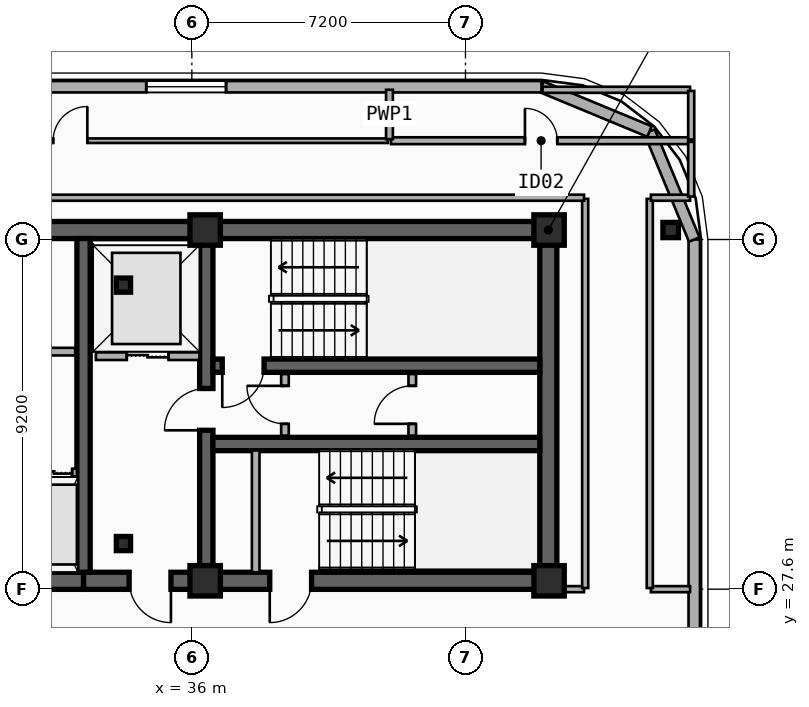
"""IFC4 building model, lengths in metres.
Left out: names, types, materials, properties, quantities, classifications, styles, units other than length and angle.
Written with IfcOpenShell. Run it as: python <this file> out.ifc"""

import sys

from ifc_helpers import new_model, si_unit, direction, frame, frame_2d, origin, origin_2d, place, context, subcontext, project, spatial, rectangle, i_section, extrude, element, fill, save


model = new_model("IFC4")
c1 = context("Model", 3, precision=1e-05, world=origin(), true_north=direction((0.0, 1.0)))
c2 = subcontext(c1, "Body", "Model", "MODEL_VIEW")
j1 = project(units=[si_unit("LENGTHUNIT", "METRE"), si_unit("PLANEANGLEUNIT", "RADIAN")], contexts=[c1])
p1 = place(None, origin())
s1 = spatial("IfcSite", under=j1, at=p1, CompositionType="ELEMENT")
p2 = place(p1, origin())
s2 = spatial("IfcBuilding", under=s1, at=p2, CompositionType="ELEMENT")
p3 = place(p2, frame((0.0, 0.0, 262.1)))
s3 = spatial("IfcBuildingStorey", under=s2, at=p3, CompositionType="ELEMENT", Elevation=262.1)
p4 = place(p3, frame((12.15, 37.05, 0.0), z_axis=(0.0, 0.0, 1.0), x_axis=(1.0, 0.0, 0.0)))
e1 = element("IfcWall", 1, at=p4, inside=s3, PredefinedType="SHEAR", context=c2, shape_type="SweptSolid", body=[
    extrude(rectangle(XDim=33.23, YDim=0.45, at=frame_2d((16.615, 0.0))), origin(), (0.0, 0.0, 1.0), 3.7),
])
p5 = place(p3, frame((33.15, 27.82, 0.0), z_axis=(0.0, 0.0, 1.0), x_axis=(-1.0, 0.0, 0.0)))
e2 = element("IfcWall", 2, at=p5, inside=s3, PredefinedType="SHEAR", context=c2, shape_type="SweptSolid", body=[
    extrude(rectangle(XDim=11.97, YDim=0.45, at=frame_2d((5.985, 0.0))), origin(), (0.0, 0.0, 1.0), 3.7),
])
p6 = place(p5, frame((6.1, 0.0, 0.0)))
e3 = element("IfcOpeningElement", 3, at=p6, cuts=e2, PredefinedType="OPENING", context=c2, shape_type="SweptSolid", body=[
    extrude(rectangle(XDim=1.6, YDim=2.2, at=frame_2d((0.8, 1.1))), frame((0.0, 0.235, 0.0), z_axis=(0.0, -1.0, 0.0), x_axis=(1.0, 0.0, 0.0)), (0.0, 0.0, 1.0), 0.47),
])
p7 = place(p3, frame((45.38, 27.82, 0.0), z_axis=(0.0, 0.0, 1.0), x_axis=(-1.0, 0.0, 0.0)))
e4 = element("IfcWall", 4, at=p7, inside=s3, PredefinedType="SHEAR", context=c2, shape_type="SweptSolid", body=[
    extrude(rectangle(XDim=12.23, YDim=0.45, at=frame_2d((6.115, 0.0))), origin(), (0.0, 0.0, 1.0), 3.7),
])
p8 = place(p7, frame((9.93, 0.0, 0.0)))
e5 = element("IfcOpeningElement", 5, at=p8, cuts=e4, PredefinedType="OPENING", context=c2, shape_type="SweptSolid", body=[
    extrude(rectangle(XDim=1.1, YDim=2.15, at=frame_2d((0.55, 1.075))), frame((0.0, 0.235, 0.0), z_axis=(0.0, -1.0, 0.0), x_axis=(1.0, 0.0, 0.0)), (0.0, 0.0, 1.0), 0.47),
])
p9 = place(p7, frame((6.23, 0.0, 0.0)))
e6 = element("IfcOpeningElement", 6, at=p9, cuts=e4, PredefinedType="OPENING", context=c2, shape_type="SweptSolid", body=[
    extrude(rectangle(XDim=1.1, YDim=2.15, at=frame_2d((0.55, 1.075))), frame((0.0, 0.235, 0.0), z_axis=(0.0, -1.0, 0.0), x_axis=(1.0, 0.0, 0.0)), (0.0, 0.0, 1.0), 0.47),
])
p10 = place(p3, frame((45.38, 28.045, 0.0), z_axis=(0.0, 0.0, 1.0), x_axis=(0.0, 1.0, 0.0)))
e7 = element("IfcWall", 7, at=p10, inside=s3, PredefinedType="SHEAR", context=c2, shape_type="SweptSolid", body=[
    extrude(rectangle(XDim=8.78, YDim=0.45, at=frame_2d((4.39, 0.0))), origin(), (0.0, 0.0, 1.0), 3.7),
])
p11 = place(p3, frame((33.15, 28.045, 0.0), z_axis=(0.0, 0.0, 1.0), x_axis=(0.0, 1.0, 0.0)))
e8 = element("IfcWall", 8, at=p11, inside=s3, PredefinedType="SHEAR", context=c2, shape_type="SweptSolid", body=[
    extrude(rectangle(XDim=8.78, YDim=0.35, at=frame_2d((4.39, 0.0))), origin(), (0.0, 0.0, 1.0), 3.7),
])
p12 = place(p3, frame((36.38, 28.045, 0.0), z_axis=(0.0, 0.0, 1.0), x_axis=(0.0, 1.0, 0.0)))
e9 = element("IfcWall", 9, at=p12, inside=s3, PredefinedType="SHEAR", context=c2, shape_type="SweptSolid", body=[
    extrude(rectangle(XDim=8.78, YDim=0.35, at=frame_2d((4.39, 0.0))), origin(), (0.0, 0.0, 1.0), 3.7),
])
p13 = place(p12, frame((3.735, 0.0, 0.0)))
e10 = element("IfcOpeningElement", 10, at=p13, cuts=e9, PredefinedType="OPENING", context=c2, shape_type="SweptSolid", body=[
    extrude(rectangle(XDim=1.1, YDim=2.15, at=frame_2d((0.55, 1.075))), frame((0.0, 0.185, 0.0), z_axis=(0.0, -1.0, 0.0), x_axis=(1.0, 0.0, 0.0)), (0.0, 0.0, 1.0), 0.37),
])
p14 = place(p3, frame((45.155, 33.48, 0.0), z_axis=(0.0, 0.0, 1.0), x_axis=(-1.0, 0.0, 0.0)))
e11 = element("IfcWall", 11, at=p14, inside=s3, PredefinedType="SHEAR", context=c2, shape_type="SweptSolid", body=[
    extrude(rectangle(XDim=8.6, YDim=0.35, at=frame_2d((4.3, 0.0))), origin(), (0.0, 0.0, 1.0), 3.7),
])
p15 = place(p14, frame((7.255, 0.0, 0.0)))
e12 = element("IfcOpeningElement", 12, at=p15, cuts=e11, PredefinedType="OPENING", context=c2, shape_type="SweptSolid", body=[
    extrude(rectangle(XDim=1.1, YDim=2.15, at=frame_2d((0.55, 1.075))), frame((0.0, 0.185, 0.0), z_axis=(0.0, -1.0, 0.0), x_axis=(1.0, 0.0, 0.0)), (0.0, 0.0, 1.0), 0.37),
])
p16 = place(p3, frame((36.555, 31.42, 0.0), z_axis=(0.0, 0.0, 1.0), x_axis=(1.0, 0.0, 0.0)))
e13 = element("IfcWall", 13, at=p16, inside=s3, PredefinedType="SHEAR", context=c2, shape_type="SweptSolid", body=[
    extrude(rectangle(XDim=8.6, YDim=0.35, at=frame_2d((4.3, 0.0))), origin(), (0.0, 0.0, 1.0), 3.7),
])
for number, where, z_axis, x_axis in (
    (14, (34.2, 28.8, 0.0), (0.0, 0.0, 1.0), (1.0, 0.0, 0.0)),
    (15, (34.2, 35.6, 0.0), (0.0, 0.0, 1.0), (1.0, 0.0, 0.0)),
):
    element("IfcColumn", number, at=place(p3, frame(where, z_axis=z_axis, x_axis=x_axis)), inside=s3, PredefinedType="COLUMN", context=c2, shape_type="SweptSolid", body=[
        extrude(i_section(OverallWidth=0.374, OverallDepth=0.372, WebThickness=0.017, FlangeThickness=0.027, FilletRadius=0.015, at=origin_2d()), origin(), (0.0, 0.0, 1.0), 3.7),
    ])
for number, where, z_axis, x_axis in (
    (16, (36.35, 27.82, 0.0), (0.0, 0.0, 1.0), (1.0, 0.0, 0.0)),
    (17, (36.35, 37.05, 0.0), (0.0, 0.0, 1.0), (1.0, 0.0, 0.0)),
    (18, (45.4, 27.82, 0.0), (0.0, 0.0, 1.0), (1.0, 0.0, 0.0)),
    (19, (45.4, 37.05, 0.0), (0.0, 0.0, 1.0), (1.0, 0.0, 0.0)),
):
    element("IfcColumn", number, at=place(p3, frame(where, z_axis=z_axis, x_axis=x_axis)), inside=s3, PredefinedType="COLUMN", context=c2, shape_type="SweptSolid", body=[
        extrude(rectangle(XDim=0.8, YDim=0.8, at=origin_2d()), origin(), (0.0, 0.0, 1.0), 3.7),
    ])
p17 = place(p3, frame((48.6, 37.05, 0.0), z_axis=(0.0, 0.0, 1.0), x_axis=(1.0, 0.0, 0.0)))
e20 = element("IfcColumn", 20, at=p17, inside=s3, PredefinedType="COLUMN", context=c2, shape_type="SweptSolid", body=[
    extrude(i_section(OverallWidth=0.408, OverallDepth=0.4, WebThickness=0.025, FlangeThickness=0.039, FilletRadius=0.015, at=origin_2d()), origin(), (0.0, 0.0, 1.0), 3.7),
])
p18 = place(p3, frame((49.22, 36.8, 0.0), z_axis=(0.0, 0.0, 1.0), x_axis=(0.0, -1.0, 0.0)))
e21 = element("IfcWall", 21, at=p18, inside=s3, PredefinedType="SOLIDWALL", context=c2, shape_type="SweptSolid", body=[
    extrude(rectangle(XDim=34.2, YDim=0.3, at=frame_2d((17.1, 0.0))), origin(), (0.0, 0.0, 1.0), 3.42),
])
p19 = place(p18, frame((17.66, 0.0, 0.75)))
e22 = element("IfcOpeningElement", 22, at=p19, cuts=e21, PredefinedType="OPENING", context=c2, shape_type="SweptSolid", body=[
    extrude(rectangle(XDim=2.1, YDim=2.1, at=frame_2d((1.05, 1.05))), frame((0.0, 0.16, 0.0), z_axis=(0.0, -1.0, 0.0), x_axis=(1.0, 0.0, 0.0)), (0.0, 0.0, 1.0), 0.32),
])
p20 = place(p18, frame((25.77, 0.0, 0.75)))
e23 = element("IfcOpeningElement", 23, at=p20, cuts=e21, PredefinedType="OPENING", context=c2, shape_type="SweptSolid", body=[
    extrude(rectangle(XDim=2.1, YDim=2.1, at=frame_2d((1.05, 1.05))), frame((0.0, 0.16, 0.0), z_axis=(0.0, -1.0, 0.0), x_axis=(1.0, 0.0, 0.0)), (0.0, 0.0, 1.0), 0.32),
])
for number, where, z_axis, x_axis in (
    (24, (48.042, 39.643, 0.0), (0.0, 0.0, 1.0), (0.383, -0.924, 0.0)),
    (25, (45.2, 40.82, 0.0), (0.0, 0.0, 1.0), (0.924, -0.383, 0.0)),
):
    element("IfcWall", number, at=place(p3, frame(where, z_axis=z_axis, x_axis=x_axis)), inside=s3, PredefinedType="SOLIDWALL", context=c2, shape_type="SweptSolid", body=[
        extrude(rectangle(XDim=3.077, YDim=0.3, at=frame_2d((1.538, 0.0))), origin(), (0.0, 0.0, 1.0), 3.42),
    ])
p21 = place(p3, frame((12.4, 40.82, 0.0), z_axis=(0.0, 0.0, 1.0), x_axis=(1.0, 0.0, 0.0)))
e26 = element("IfcWall", 26, at=p21, inside=s3, PredefinedType="SOLIDWALL", context=c2, shape_type="SweptSolid", body=[
    extrude(rectangle(XDim=32.8, YDim=0.3, at=frame_2d((16.4, 0.0))), origin(), (0.0, 0.0, 1.0), 3.42),
])
p22 = place(p21, frame((2.713, 0.0, 0.75)))
e27 = element("IfcOpeningElement", 27, at=p22, cuts=e26, PredefinedType="OPENING", context=c2, shape_type="SweptSolid", body=[
    extrude(rectangle(XDim=2.1, YDim=2.1, at=frame_2d((1.05, 1.05))), frame((0.0, 0.16, 0.0), z_axis=(0.0, -1.0, 0.0), x_axis=(1.0, 0.0, 0.0)), (0.0, 0.0, 1.0), 0.32),
])
p23 = place(p21, frame((7.207, 0.0, 0.75)))
e28 = element("IfcOpeningElement", 28, at=p23, cuts=e26, PredefinedType="OPENING", context=c2, shape_type="SweptSolid", body=[
    extrude(rectangle(XDim=2.1, YDim=2.1, at=frame_2d((1.05, 1.05))), frame((0.0, 0.16, 0.0), z_axis=(0.0, -1.0, 0.0), x_axis=(1.0, 0.0, 0.0)), (0.0, 0.0, 1.0), 0.32),
])
p24 = place(p21, frame((16.3, 0.0, 0.75)))
e29 = element("IfcOpeningElement", 29, at=p24, cuts=e26, PredefinedType="OPENING", context=c2, shape_type="SweptSolid", body=[
    extrude(rectangle(XDim=2.1, YDim=2.1, at=frame_2d((1.05, 1.05))), frame((0.0, 0.16, 0.0), z_axis=(0.0, -1.0, 0.0), x_axis=(1.0, 0.0, 0.0)), (0.0, 0.0, 1.0), 0.32),
])
p25 = place(p21, frame((22.4, 0.0, 0.75)))
e30 = element("IfcOpeningElement", 30, at=p25, cuts=e26, PredefinedType="OPENING", context=c2, shape_type="SweptSolid", body=[
    extrude(rectangle(XDim=2.1, YDim=2.1, at=frame_2d((1.05, 1.05))), frame((0.0, 0.16, 0.0), z_axis=(0.0, -1.0, 0.0), x_axis=(1.0, 0.0, 0.0)), (0.0, 0.0, 1.0), 0.32),
])
p26 = place(p3, frame((33.475, 33.73, 0.0), z_axis=(0.0, 0.0, 1.0), x_axis=(1.0, 0.0, 0.0)))
e31 = element("IfcWall", 31, at=p26, inside=s3, PredefinedType="PARTITIONING", context=c2, shape_type="SweptSolid", body=[
    extrude(rectangle(XDim=2.725, YDim=0.2, at=frame_2d((1.362, 0.0))), origin(), (0.0, 0.0, 1.0), 2.49),
])
p27 = place(p26, frame((0.812, 0.0, 0.0)))
e32 = element("IfcOpeningElement", 32, at=p27, cuts=e31, PredefinedType="OPENING", context=c2, shape_type="SweptSolid", body=[
    extrude(rectangle(XDim=1.1, YDim=2.15, at=frame_2d((0.55, 1.075))), frame((0.0, 0.11, 0.0), z_axis=(0.0, -1.0, 0.0), x_axis=(1.0, 0.0, 0.0)), (0.0, 0.0, 1.0), 0.22),
])
p28 = place(p3, frame((31.775, 30.67, 0.0), z_axis=(0.0, 0.0, 1.0), x_axis=(1.0, 0.0, 0.0)))
e33 = element("IfcWall", 33, at=p28, inside=s3, PredefinedType="PARTITIONING", context=c2, shape_type="SweptSolid", body=[
    extrude(rectangle(XDim=1.2, YDim=0.2, at=frame_2d((0.6, 0.0))), origin(), (0.0, 0.0, 1.0), 2.8),
])
p29 = place(p28, frame((0.125, 0.0, 0.0)))
e34 = element("IfcOpeningElement", 34, at=p29, cuts=e33, PredefinedType="OPENING", context=c2, shape_type="SweptSolid", body=[
    extrude(rectangle(XDim=0.95, YDim=2.15, at=frame_2d((0.475, 1.075))), frame((0.0, 0.11, 0.0), z_axis=(0.0, -1.0, 0.0), x_axis=(1.0, 0.0, 0.0)), (0.0, 0.0, 1.0), 0.22),
])
p30 = place(p3, frame((37.68, 28.045, 0.0), z_axis=(0.0, 0.0, 1.0), x_axis=(0.0, 1.0, 0.0)))
e35 = element("IfcWall", 35, at=p30, inside=s3, PredefinedType="PARTITIONING", context=c2, shape_type="SweptSolid", body=[
    extrude(rectangle(XDim=3.205, YDim=0.2, at=frame_2d((1.603, 0.0))), origin(), (0.0, 0.0, 1.0), 2.8),
])
p31 = place(p3, frame((38.45, 31.64, 0.0), z_axis=(0.0, 0.0, 1.0), x_axis=(0.0, 1.0, 0.0)))
e36 = element("IfcWall", 36, at=p31, inside=s3, PredefinedType="PARTITIONING", context=c2, shape_type="SweptSolid", body=[
    extrude(rectangle(XDim=1.62, YDim=0.2, at=frame_2d((0.81, 0.0))), origin(), (0.0, 0.0, 1.0), 3.42),
])
p32 = place(p31, frame((0.31, 0.0, 0.0)))
e37 = element("IfcOpeningElement", 37, at=p32, cuts=e36, PredefinedType="OPENING", context=c2, shape_type="SweptSolid", body=[
    extrude(rectangle(XDim=1.0, YDim=2.15, at=frame_2d((0.5, 1.075))), frame((0.0, 0.11, 0.0), z_axis=(0.0, -1.0, 0.0), x_axis=(1.0, 0.0, 0.0)), (0.0, 0.0, 1.0), 0.22),
])
p33 = place(p3, frame((41.8, 31.64, 0.0), z_axis=(0.0, 0.0, 1.0), x_axis=(0.0, 1.0, 0.0)))
e38 = element("IfcWall", 38, at=p33, inside=s3, PredefinedType="PARTITIONING", context=c2, shape_type="SweptSolid", body=[
    extrude(rectangle(XDim=1.62, YDim=0.2, at=frame_2d((0.81, 0.0))), origin(), (0.0, 0.0, 1.0), 3.42),
])
p34 = place(p33, frame((0.31, 0.0, 0.0)))
e39 = element("IfcOpeningElement", 39, at=p34, cuts=e38, PredefinedType="OPENING", context=c2, shape_type="SweptSolid", body=[
    extrude(rectangle(XDim=1.0, YDim=2.15, at=frame_2d((0.5, 1.075))), frame((0.0, 0.11, 0.0), z_axis=(0.0, -1.0, 0.0), x_axis=(1.0, 0.0, 0.0)), (0.0, 0.0, 1.0), 0.22),
])
p35 = place(p3, frame((27.24, 33.85, 0.0), z_axis=(0.0, 0.0, 1.0), x_axis=(1.0, 0.0, 0.0)))
e40 = element("IfcWall", 40, at=p35, inside=s3, PredefinedType="PARTITIONING", context=c2, shape_type="SweptSolid", body=[
    extrude(rectangle(XDim=5.69, YDim=0.2, at=frame_2d((2.845, 0.0))), origin(), (0.0, 0.0, 1.0), 2.49),
])
p36 = place(p35, frame((2.245, 0.0, 0.0)))
e41 = element("IfcOpeningElement", 41, at=p36, cuts=e40, PredefinedType="OPENING", context=c2, shape_type="SweptSolid", body=[
    extrude(rectangle(XDim=1.2, YDim=2.15, at=frame_2d((0.6, 1.075))), frame((0.0, 0.11, 0.0), z_axis=(0.0, -1.0, 0.0), x_axis=(1.0, 0.0, 0.0)), (0.0, 0.0, 1.0), 0.22),
])
p37 = place(p3, frame((24.44, 39.4, 0.0), z_axis=(0.0, 0.0, 1.0), x_axis=(1.0, 0.0, 0.0)))
e42 = element("IfcWall", 42, at=p37, inside=s3, PredefinedType="PARTITIONING", context=c2, shape_type="SweptSolid", body=[
    extrude(rectangle(XDim=16.72, YDim=0.12, at=frame_2d((8.36, 0.0))), origin(), (0.0, 0.0, 1.0), 3.42),
])
p38 = place(p37, frame((7.91, 0.0, 0.0)))
e43 = element("IfcOpeningElement", 43, at=p38, cuts=e42, PredefinedType="OPENING", context=c2, shape_type="SweptSolid", body=[
    extrude(rectangle(XDim=0.9, YDim=2.1, at=frame_2d((0.45, 1.05))), frame((0.0, 0.07, 0.0), z_axis=(0.0, -1.0, 0.0), x_axis=(1.0, 0.0, 0.0)), (0.0, 0.0, 1.0), 0.14),
])
p39 = place(p3, frame((41.24, 39.4, 0.0), z_axis=(0.0, 0.0, 1.0), x_axis=(1.0, 0.0, 0.0)))
e44 = element("IfcWall", 44, at=p39, inside=s3, PredefinedType="PLUMBINGWALL", context=c2, shape_type="SweptSolid", body=[
    extrude(rectangle(XDim=7.9, YDim=0.18, at=frame_2d((3.95, 0.0))), origin(), (0.0, 0.0, 1.0), 3.42),
])
p40 = place(p39, frame((3.525, 0.0, 0.0)))
e45 = element("IfcOpeningElement", 45, at=p40, cuts=e44, PredefinedType="OPENING", context=c2, shape_type="SweptSolid", body=[
    extrude(rectangle(XDim=0.85, YDim=2.1, at=frame_2d((0.425, 1.05))), frame((0.0, 0.1, 0.0), z_axis=(0.0, -1.0, 0.0), x_axis=(1.0, 0.0, 0.0)), (0.0, 0.0, 1.0), 0.2),
])
p41 = place(p3, frame((41.2, 39.44, 0.0), z_axis=(0.0, 0.0, 1.0), x_axis=(0.0, 1.0, 0.0)))
e46 = element("IfcWall", 46, at=p41, inside=s3, PredefinedType="PLUMBINGWALL", context=c2, shape_type="SweptSolid", body=[
    extrude(rectangle(XDim=1.3, YDim=0.18, at=frame_2d((0.65, 0.0))), origin(), (0.0, 0.0, 1.0), 3.42),
])
p42 = place(p3, frame((45.41, 27.6, 0.0), z_axis=(0.0, 0.0, 1.0), x_axis=(1.0, 0.0, 0.0)))
e47 = element("IfcWall", 47, at=p42, inside=s3, PredefinedType="PARTITIONING", context=c2, shape_type="SweptSolid", body=[
    extrude(rectangle(XDim=0.91, YDim=0.16, at=frame_2d((0.455, 0.0))), origin(), (0.0, 0.0, 1.0), 2.49),
])
p43 = place(p3, frame((48.08, 27.6, 0.0), z_axis=(0.0, 0.0, 1.0), x_axis=(1.0, 0.0, 0.0)))
e48 = element("IfcWall", 48, at=p43, inside=s3, PredefinedType="PARTITIONING", context=c2, shape_type="SweptSolid", body=[
    extrude(rectangle(XDim=1.03, YDim=0.16, at=frame_2d((0.515, 0.0))), origin(), (0.0, 0.0, 1.0), 3.42),
])
for number, where, z_axis, x_axis in (
    (49, (46.35, 27.63, 0.0), (0.0, 0.0, 1.0), (0.0, 1.0, 0.0)),
    (50, (48.05, 27.63, 0.0), (0.0, 0.0, 1.0), (0.0, 1.0, 0.0)),
):
    element("IfcWall", number, at=place(p3, frame(where, z_axis=z_axis, x_axis=x_axis)), inside=s3, PredefinedType="PARTITIONING", context=c2, shape_type="SweptSolid", body=[
        extrude(rectangle(XDim=10.24, YDim=0.16, at=frame_2d((5.12, 0.0))), origin(), (0.0, 0.0, 1.0), 2.9),
    ])
p44 = place(p3, frame((11.28, 37.9, 0.0), z_axis=(0.0, 0.0, 1.0), x_axis=(1.0, 0.0, 0.0)))
e51 = element("IfcWall", 51, at=p44, inside=s3, PredefinedType="PARTITIONING", context=c2, shape_type="SweptSolid", body=[
    extrude(rectangle(XDim=35.04, YDim=0.16, at=frame_2d((17.52, 0.0))), origin(), (0.0, 0.0, 1.0), 3.42),
])
p45 = place(p3, frame((48.08, 37.9, 0.0), z_axis=(0.0, 0.0, 1.0), x_axis=(1.0, 0.0, 0.0)))
e52 = element("IfcWall", 52, at=p45, inside=s3, PredefinedType="PARTITIONING", context=c2, shape_type="SweptSolid", body=[
    extrude(rectangle(XDim=1.03, YDim=0.16, at=frame_2d((0.515, 0.0))), origin(), (0.0, 0.0, 1.0), 3.42),
])
p46 = place(p3, frame((49.14, 37.93, 0.0), z_axis=(0.0, 0.0, 1.0), x_axis=(0.0, 1.0, 0.0)))
e53 = element("IfcWall", 53, at=p46, inside=s3, PredefinedType="PARTITIONING", context=c2, shape_type="SweptSolid", body=[
    extrude(rectangle(XDim=1.44, YDim=0.16, at=frame_2d((0.72, 0.0))), origin(), (0.0, 0.0, 1.0), 3.42),
])
p47 = place(p3, frame((45.23, 40.74, 0.0), z_axis=(0.0, 0.0, 1.0), x_axis=(1.0, 0.0, 0.0)))
e54 = element("IfcWall", 54, at=p47, inside=s3, PredefinedType="PARTITIONING", context=c2, shape_type="SweptSolid", body=[
    extrude(rectangle(XDim=3.88, YDim=0.16, at=frame_2d((1.94, 0.0))), origin(), (0.0, 0.0, 1.0), 3.42),
])
p48 = place(p3, frame((49.14, 39.43, 0.0), z_axis=(0.0, 0.0, 1.0), x_axis=(0.0, 1.0, 0.0)))
e55 = element("IfcWall", 55, at=p48, inside=s3, PredefinedType="PARTITIONING", context=c2, shape_type="SweptSolid", body=[
    extrude(rectangle(XDim=1.28, YDim=0.16, at=frame_2d((0.64, 0.0))), origin(), (0.0, 0.0, 1.0), 3.42),
])
p49 = place(p25, origin())
e56 = element("IfcWindow", 56, at=p49, inside=s3, PartitioningType="SINGLE_PANEL", PredefinedType="WINDOW", context=c2, shape_type="SweptSolid", body=[
    extrude(rectangle(XDim=2.1, YDim=2.1, at=frame_2d((1.05, 1.05))), frame((0.0, 0.03, 0.0), z_axis=(0.0, -1.0, 0.0), x_axis=(1.0, 0.0, 0.0)), (0.0, 0.0, 1.0), 0.06),
])
fill(e30, e56)
p50 = place(p27, origin())
e57 = element("IfcDoor", 57, at=p50, inside=s3, OperationType="DOUBLE_DOOR_SLIDING", PredefinedType="DOOR", context=c2, shape_type="SweptSolid", body=[
    extrude(rectangle(XDim=1.1, YDim=2.15, at=frame_2d((0.55, 1.075))), frame((0.0, 0.025, 0.0), z_axis=(0.0, -1.0, 0.0), x_axis=(1.0, 0.0, 0.0)), (0.0, 0.0, 1.0), 0.05),
])
fill(e32, e57)
p51 = place(p29, origin())
e58 = element("IfcDoor", 58, at=p51, inside=s3, OperationType="DOUBLE_DOOR_SLIDING", PredefinedType="DOOR", context=c2, shape_type="SweptSolid", body=[
    extrude(rectangle(XDim=0.95, YDim=2.15, at=frame_2d((0.475, 1.075))), frame((0.0, 0.025, 0.0), z_axis=(0.0, -1.0, 0.0), x_axis=(1.0, 0.0, 0.0)), (0.0, 0.0, 1.0), 0.05),
])
fill(e34, e58)
p52 = place(p15, origin())
e59 = element("IfcDoor", 59, at=p52, inside=s3, OperationType="SINGLE_SWING_RIGHT", PredefinedType="DOOR", context=c2, shape_type="SweptSolid", body=[
    extrude(rectangle(XDim=1.1, YDim=2.15, at=frame_2d((0.55, 1.075))), frame((0.0, 0.025, 0.0), z_axis=(0.0, -1.0, 0.0), x_axis=(1.0, 0.0, 0.0)), (0.0, 0.0, 1.0), 0.05),
])
fill(e12, e59)
p53 = place(p13, origin())
e60 = element("IfcDoor", 60, at=p53, inside=s3, OperationType="SINGLE_SWING_LEFT", PredefinedType="DOOR", context=c2, shape_type="SweptSolid", body=[
    extrude(rectangle(XDim=1.1, YDim=2.15, at=frame_2d((0.55, 1.075))), frame((0.0, 0.025, 0.0), z_axis=(0.0, -1.0, 0.0), x_axis=(1.0, 0.0, 0.0)), (0.0, 0.0, 1.0), 0.05),
])
fill(e10, e60)
p54 = place(p8, origin())
e61 = element("IfcDoor", 61, at=p54, inside=s3, OperationType="SINGLE_SWING_LEFT", PredefinedType="DOOR", context=c2, shape_type="SweptSolid", body=[
    extrude(rectangle(XDim=1.1, YDim=2.15, at=frame_2d((0.55, 1.075))), frame((0.0, 0.025, 0.0), z_axis=(0.0, -1.0, 0.0), x_axis=(1.0, 0.0, 0.0)), (0.0, 0.0, 1.0), 0.05),
])
fill(e5, e61)
p55 = place(p9, origin())
e62 = element("IfcDoor", 62, at=p55, inside=s3, OperationType="SINGLE_SWING_RIGHT", PredefinedType="DOOR", context=c2, shape_type="SweptSolid", body=[
    extrude(rectangle(XDim=1.1, YDim=2.15, at=frame_2d((0.55, 1.075))), frame((0.0, 0.025, 0.0), z_axis=(0.0, -1.0, 0.0), x_axis=(1.0, 0.0, 0.0)), (0.0, 0.0, 1.0), 0.05),
])
fill(e6, e62)
p56 = place(p32, origin())
e63 = element("IfcDoor", 63, at=p56, inside=s3, OperationType="SINGLE_SWING_RIGHT", PredefinedType="DOOR", context=c2, shape_type="SweptSolid", body=[
    extrude(rectangle(XDim=1.0, YDim=2.15, at=frame_2d((0.5, 1.075))), frame((0.0, 0.025, 0.0), z_axis=(0.0, -1.0, 0.0), x_axis=(1.0, 0.0, 0.0)), (0.0, 0.0, 1.0), 0.05),
])
fill(e37, e63)
p57 = place(p34, origin())
e64 = element("IfcDoor", 64, at=p57, inside=s3, OperationType="SINGLE_SWING_LEFT", PredefinedType="DOOR", context=c2, shape_type="SweptSolid", body=[
    extrude(rectangle(XDim=1.0, YDim=2.15, at=frame_2d((0.5, 1.075))), frame((0.0, 0.025, 0.0), z_axis=(0.0, -1.0, 0.0), x_axis=(1.0, 0.0, 0.0)), (0.0, 0.0, 1.0), 0.05),
])
fill(e39, e64)
p58 = place(p38, origin())
e65 = element("IfcDoor", 65, at=p58, inside=s3, OperationType="SINGLE_SWING_RIGHT", PredefinedType="DOOR", context=c2, shape_type="SweptSolid", body=[
    extrude(rectangle(XDim=0.9, YDim=2.1, at=frame_2d((0.45, 1.05))), frame((0.0, 0.025, 0.0), z_axis=(0.0, -1.0, 0.0), x_axis=(1.0, 0.0, 0.0)), (0.0, 0.0, 1.0), 0.05),
])
fill(e43, e65)
p59 = place(p40, origin())
e66 = element("IfcDoor", 66, at=p59, inside=s3, OperationType="SINGLE_SWING_LEFT", PredefinedType="DOOR", context=c2, shape_type="SweptSolid", body=[
    extrude(rectangle(XDim=0.85, YDim=2.1, at=frame_2d((0.425, 1.05))), frame((0.0, 0.025, 0.0), z_axis=(0.0, -1.0, 0.0), x_axis=(1.0, 0.0, 0.0)), (0.0, 0.0, 1.0), 0.05),
])
fill(e45, e66)
save(model, sys.argv[1])
